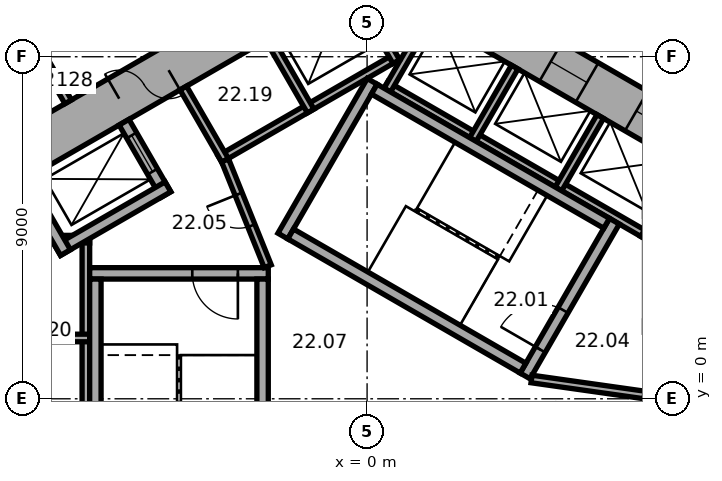
"""IFC4 building model, lengths in metres.
Left out: names, types, materials, properties, quantities, classifications, styles, units other than length and angle.
Written with IfcOpenShell. Run it as: python <this file> out.ifc"""

import sys

from ifc_helpers import new_model, si_unit, direction, frame, frame_2d, origin, place, context, subcontext, project, spatial, rectangle, extrude, element, fill, save


model = new_model("IFC4")
c1 = context("Model", 3, precision=1e-05, world=origin(), true_north=direction((0.0, 1.0)))
c2 = subcontext(c1, "Body", "Model", "MODEL_VIEW")
j1 = project(units=[si_unit("LENGTHUNIT", "METRE"), si_unit("PLANEANGLEUNIT", "RADIAN")], contexts=[c1])
p1 = place(None, origin())
s1 = spatial("IfcSite", under=j1, at=p1, CompositionType="ELEMENT")
p2 = place(p1, origin())
s2 = spatial("IfcBuilding", under=s1, at=p2, CompositionType="ELEMENT")
p3 = place(p2, frame((0.0, 0.0, 96.8)))
s3 = spatial("IfcBuildingStorey", under=s2, at=p3, CompositionType="ELEMENT", Elevation=96.8)
p4 = place(p3, frame((10.4, 5.658, 0.0), z_axis=(0.0, 0.0, 1.0), x_axis=(-0.866021384402, 0.500006961711, 0.0)))
e1 = element("IfcWall", 1, at=p4, inside=s3, PredefinedType="SHEAR", context=c2, shape_type="SweptSolid", body=[
    extrude(rectangle(XDim=12.355, YDim=1.2, at=frame_2d((6.178, 0.0))), origin(), (0.0, 0.0, 1.0), 3.3),
])
p5 = place(p4, frame((2.728, 0.0, 0.0)))
e2 = element("IfcOpeningElement", 2, at=p5, cuts=e1, PredefinedType="OPENING", context=c2, shape_type="SweptSolid", body=[
    extrude(rectangle(XDim=1.1, YDim=2.1, at=frame_2d((0.55, 1.05))), frame((0.0, 0.61, 0.0), z_axis=(0.0, -1.0, 0.0), x_axis=(1.0, 0.0, 0.0)), (0.0, 0.0, 1.0), 1.22),
])
p6 = place(p4, frame((5.328, 0.0, 0.0)))
e3 = element("IfcOpeningElement", 3, at=p6, cuts=e1, PredefinedType="OPENING", context=c2, shape_type="SweptSolid", body=[
    extrude(rectangle(XDim=1.1, YDim=2.1, at=frame_2d((0.55, 1.05))), frame((0.0, 0.61, 0.0), z_axis=(0.0, -1.0, 0.0), x_axis=(1.0, 0.0, 0.0)), (0.0, 0.0, 1.0), 1.22),
])
p7 = place(p4, frame((7.928, 0.0, 0.0)))
e4 = element("IfcOpeningElement", 4, at=p7, cuts=e1, PredefinedType="OPENING", context=c2, shape_type="SweptSolid", body=[
    extrude(rectangle(XDim=1.1, YDim=2.1, at=frame_2d((0.55, 1.05))), frame((0.0, 0.61, 0.0), z_axis=(0.0, -1.0, 0.0), x_axis=(1.0, 0.0, 0.0)), (0.0, 0.0, 1.0), 1.22),
])
p8 = place(p3, frame((0.3, 11.836, 0.0), z_axis=(0.0, 0.0, 1.0), x_axis=(-0.866021384402, -0.500006961711, 0.0)))
e5 = element("IfcWall", 5, at=p8, inside=s3, PredefinedType="SHEAR", context=c2, shape_type="SweptSolid", body=[
    extrude(rectangle(XDim=12.355, YDim=1.2, at=frame_2d((6.178, 0.0))), origin(), (0.0, 0.0, 1.0), 3.3),
])
p9 = place(p8, frame((6.378, 0.0, 0.0)))
e6 = element("IfcOpeningElement", 6, at=p9, cuts=e5, PredefinedType="OPENING", context=c2, shape_type="SweptSolid", body=[
    extrude(rectangle(XDim=1.5, YDim=2.1, at=frame_2d((0.75, 1.05))), frame((0.0, 0.61, 0.0), z_axis=(0.0, -1.0, 0.0), x_axis=(1.0, 0.0, 0.0)), (0.0, 0.0, 1.0), 1.22),
])
p10 = place(p8, frame((1.828, 0.0, 0.0)))
e7 = element("IfcOpeningElement", 7, at=p10, cuts=e5, PredefinedType="OPENING", context=c2, shape_type="SweptSolid", body=[
    extrude(rectangle(XDim=1.1, YDim=2.1, at=frame_2d((0.55, 1.05))), frame((0.0, 0.61, 0.0), z_axis=(0.0, -1.0, 0.0), x_axis=(1.0, 0.0, 0.0)), (0.0, 0.0, 1.0), 1.22),
])
p11 = place(p3, frame((7.424, 4.259, 0.0), z_axis=(0.0, 0.0, 1.0), x_axis=(-0.866026010844, 0.49999894854, 0.0)))
e8 = element("IfcWall", 8, at=p11, inside=s3, PredefinedType="PARTITIONING", context=c2, shape_type="SweptSolid", body=[
    extrude(rectangle(XDim=8.0, YDim=0.2, at=frame_2d((4.0, 0.0))), origin(), (0.0, 0.0, 1.0), 3.05),
])
for number, where, z_axis, x_axis in (
    (9, (7.287, 4.222, 0.0), (0.0, 0.0, 1.0), (0.5, 0.866, 0.0)),
    (10, (5.036, 5.522, 0.0), (0.0, 0.0, 1.0), (0.5, 0.866, 0.0)),
    (11, (2.784, 6.822, 0.0), (0.0, 0.0, 1.0), (0.5, 0.866, 0.0)),
    (12, (0.532, 8.122, 0.0), (0.0, 0.0, 1.0), (0.5, 0.866, 0.0)),
):
    element("IfcWall", number, at=place(p3, frame(where, z_axis=z_axis, x_axis=x_axis)), inside=s3, PredefinedType="PARTITIONING", context=c2, shape_type="SweptSolid", body=[
        extrude(rectangle(XDim=2.2, YDim=0.2, at=frame_2d((1.1, 0.0))), origin(), (0.0, 0.0, 1.0), 3.05),
    ])
p12 = place(p3, frame((0.803, 9.009, 0.0), z_axis=(0.0, 0.0, 1.0), x_axis=(-0.866028230842, -0.499995103361, 0.0)))
e13 = element("IfcWall", 13, at=p12, inside=s3, PredefinedType="PARTITIONING", context=c2, shape_type="SweptSolid", body=[
    extrude(rectangle(XDim=5.4, YDim=0.2, at=frame_2d((2.7, 0.0))), origin(), (0.0, 0.0, 1.0), 3.05),
])
p13 = place(p3, frame((0.767, 8.872, 0.0), z_axis=(0.0, 0.0, 1.0), x_axis=(-0.499994660107, 0.866028486751, 0.0)))
e14 = element("IfcWall", 14, at=p13, inside=s3, PredefinedType="PARTITIONING", context=c2, shape_type="SweptSolid", body=[
    extrude(rectangle(XDim=2.2, YDim=0.2, at=frame_2d((1.1, 0.0))), origin(), (0.0, 0.0, 1.0), 3.05),
])
for number, where, z_axis, x_axis in (
    (15, (-1.485, 7.572, 0.0), (0.0, 0.0, 1.0), (-0.5, 0.866, 0.0)),
    (16, (-3.737, 6.272, 0.0), (0.0, 0.0, 1.0), (-0.5, 0.866, 0.0)),
):
    element("IfcWall", number, at=place(p3, frame(where, z_axis=z_axis, x_axis=x_axis)), inside=s3, PredefinedType="PARTITIONING", context=c2, shape_type="SweptSolid", body=[
        extrude(rectangle(XDim=2.2, YDim=0.2, at=frame_2d((1.1, 0.0))), origin(), (0.0, 0.0, 1.0), 3.05),
    ])
p14 = place(p3, frame((-7.4, 4.3, 0.0), z_axis=(0.0, 0.0, 1.0), x_axis=(0.0, -1.0, 0.0)))
e17 = element("IfcWall", 17, at=p14, inside=s3, PredefinedType="PARTITIONING", context=c2, shape_type="SweptSolid", body=[
    extrude(rectangle(XDim=8.0, YDim=0.2, at=frame_2d((4.0, 0.0))), origin(), (0.0, 0.0, 1.0), 3.05),
])
for number, where, z_axis, x_axis in (
    (18, (-7.3, 4.2, 0.0), (0.0, 0.0, 1.0), (-1.0, 0.0, 0.0)),
    (19, (-7.3, 1.6, 0.0), (0.0, 0.0, 1.0), (-1.0, 0.0, 0.0)),
):
    element("IfcWall", number, at=place(p3, frame(where, z_axis=z_axis, x_axis=x_axis)), inside=s3, PredefinedType="PARTITIONING", context=c2, shape_type="SweptSolid", body=[
        extrude(rectangle(XDim=2.2, YDim=0.2, at=frame_2d((1.1, 0.0))), origin(), (0.0, 0.0, 1.0), 3.05),
    ])
p15 = place(p3, frame((4.158, 0.602, 0.0), z_axis=(0.0, 0.0, 1.0), x_axis=(0.499977259774, 0.866038532462, 0.0)))
e20 = element("IfcWall", 20, at=p15, inside=s3, PredefinedType="SHEAR", context=c2, shape_type="SweptSolid", body=[
    extrude(rectangle(XDim=4.7, YDim=0.3, at=frame_2d((2.35, 0.0))), origin(), (0.0, 0.0, 1.0), 3.05),
])
p16 = place(p15, frame((0.8, 0.0, 0.0)))
e21 = element("IfcOpeningElement", 21, at=p16, cuts=e20, PredefinedType="OPENING", context=c2, shape_type="SweptSolid", body=[
    extrude(rectangle(XDim=1.2, YDim=2.1, at=frame_2d((0.6, 1.05))), frame((0.0, 0.16, 0.0), z_axis=(0.0, -1.0, 0.0), x_axis=(1.0, 0.0, 0.0)), (0.0, 0.0, 1.0), 0.32),
])
p17 = place(p3, frame((-2.216, 4.282, 0.0), z_axis=(0.0, 0.0, 1.0), x_axis=(0.499977259774, 0.866038532462, 0.0)))
e22 = element("IfcWall", 22, at=p17, inside=s3, PredefinedType="SHEAR", context=c2, shape_type="SweptSolid", body=[
    extrude(rectangle(XDim=4.7, YDim=0.3, at=frame_2d((2.35, 0.0))), origin(), (0.0, 0.0, 1.0), 3.05),
])
for number, where, z_axis, x_axis in (
    (23, (4.103, 0.807, 0.0), (0.0, 0.0, 1.0), (-0.866, 0.5, 0.0)),
    (24, (6.303, 4.617, 0.0), (0.0, 0.0, 1.0), (-0.866, 0.5, 0.0)),
):
    element("IfcWall", number, at=place(p3, frame(where, z_axis=z_axis, x_axis=x_axis)), inside=s3, PredefinedType="SHEAR", context=c2, shape_type="SweptSolid", body=[
        extrude(rectangle(XDim=7.06, YDim=0.3, at=frame_2d((3.53, 0.0))), origin(), (0.0, 0.0, 1.0), 3.05),
    ])
p18 = place(p3, frame((-2.6, 3.3, 0.0), z_axis=(0.0, 0.0, 1.0), x_axis=(-1.0, 0.0, 0.0)))
e25 = element("IfcWall", 25, at=p18, inside=s3, PredefinedType="SHEAR", context=c2, shape_type="SweptSolid", body=[
    extrude(rectangle(XDim=4.7, YDim=0.3, at=frame_2d((2.35, 0.0))), origin(), (0.0, 0.0, 1.0), 3.05),
])
p19 = place(p18, frame((0.8, 0.0, 0.0)))
e26 = element("IfcOpeningElement", 26, at=p19, cuts=e25, PredefinedType="OPENING", context=c2, shape_type="SweptSolid", body=[
    extrude(rectangle(XDim=1.2, YDim=2.1, at=frame_2d((0.6, 1.05))), frame((0.0, 0.16, 0.0), z_axis=(0.0, -1.0, 0.0), x_axis=(1.0, 0.0, 0.0)), (0.0, 0.0, 1.0), 0.32),
])
for number, where, z_axis, x_axis in (
    (27, (-2.75, 3.15, 0.0), (0.0, 0.0, 1.0), (0.0, -1.0, 0.0)),
    (28, (-7.15, 3.15, 0.0), (0.0, 0.0, 1.0), (0.0, -1.0, 0.0)),
):
    element("IfcWall", number, at=place(p3, frame(where, z_axis=z_axis, x_axis=x_axis)), inside=s3, PredefinedType="SHEAR", context=c2, shape_type="SweptSolid", body=[
        extrude(rectangle(XDim=7.06, YDim=0.3, at=frame_2d((3.53, 0.0))), origin(), (0.0, 0.0, 1.0), 3.05),
    ])
p20 = place(p3, frame((4.327, 0.521, 0.0), z_axis=(0.0, 0.0, 1.0), x_axis=(0.990124376366, -0.14019172346, 0.0)))
e29 = element("IfcWall", 29, at=p20, inside=s3, PredefinedType="PARTITIONING", context=c2, shape_type="SweptSolid", body=[
    extrude(rectangle(XDim=3.002, YDim=0.2, at=frame_2d((1.501, 0.0))), origin(), (0.0, 0.0, 1.0), 3.05),
])
p21 = place(p3, frame((-5.295, 5.372, 0.0), z_axis=(0.0, 0.0, 1.0), x_axis=(-0.500077893725, 0.86598042715, 0.0)))
e30 = element("IfcWall", 30, at=p21, inside=s3, PredefinedType="SHEAR", context=c2, shape_type="SweptSolid", body=[
    extrude(rectangle(XDim=2.2, YDim=0.3, at=frame_2d((1.1, 0.0))), origin(), (0.0, 0.0, 1.0), 3.05),
])
p22 = place(p21, frame((0.7, 0.0, 0.0)))
e31 = element("IfcOpeningElement", 31, at=p22, cuts=e30, PredefinedType="OPENING", context=c2, shape_type="SweptSolid", body=[
    extrude(rectangle(XDim=1.1, YDim=2.1, at=frame_2d((0.55, 1.05))), frame((0.0, 0.16, 0.0), z_axis=(0.0, -1.0, 0.0), x_axis=(1.0, 0.0, 0.0)), (0.0, 0.0, 1.0), 0.32),
])
p23 = place(p3, frame((-5.24, 5.577, 0.0), z_axis=(0.0, 0.0, 1.0), x_axis=(-0.866014461049, -0.500018952895, 0.0)))
e32 = element("IfcWall", 32, at=p23, inside=s3, PredefinedType="SHEAR", context=c2, shape_type="SweptSolid", body=[
    extrude(rectangle(XDim=3.35, YDim=0.3, at=frame_2d((1.675, 0.0))), origin(), (0.0, 0.0, 1.0), 3.05),
])
p24 = place(p3, frame((-7.937, 3.847, 0.0), z_axis=(0.0, 0.0, 1.0), x_axis=(-0.50002983664, 0.866008176907, 0.0)))
e33 = element("IfcWall", 33, at=p24, inside=s3, PredefinedType="SHEAR", context=c2, shape_type="SweptSolid", body=[
    extrude(rectangle(XDim=2.2, YDim=0.3, at=frame_2d((1.1, 0.0))), origin(), (0.0, 0.0, 1.0), 3.05),
])
p25 = place(p3, frame((-2.615, 3.487, 0.0), z_axis=(0.0, 0.0, 1.0), x_axis=(-0.373576831041, 0.92759924068, 0.0)))
e34 = element("IfcWall", 34, at=p25, inside=s3, PredefinedType="PARTITIONING", context=c2, shape_type="SweptSolid", body=[
    extrude(rectangle(XDim=3.002, YDim=0.2, at=frame_2d((1.501, 0.0))), origin(), (0.0, 0.0, 1.0), 3.05),
])
p26 = place(p25, frame((1.15, 0.0, 0.0)))
e35 = element("IfcOpeningElement", 35, at=p26, cuts=e34, PredefinedType="OPENING", context=c2, shape_type="SweptSolid", body=[
    extrude(rectangle(XDim=0.9, YDim=2.1, at=frame_2d((0.45, 1.05))), frame((0.0, 0.11, 0.0), z_axis=(0.0, -1.0, 0.0), x_axis=(1.0, 0.0, 0.0)), (0.0, 0.0, 1.0), 0.22),
])
p27 = place(p3, frame((-7.865, 7.814, 0.0), z_axis=(0.0, 0.0, 1.0), x_axis=(-0.500004234368, 0.866022959057, 0.0)))
e36 = element("IfcWall", 36, at=p27, inside=s3, PredefinedType="PARTITIONING", context=c2, shape_type="SweptSolid", body=[
    extrude(rectangle(XDim=11.25, YDim=0.2, at=frame_2d((5.625, 0.0))), origin(), (0.0, 0.0, 1.0), 3.05),
])
p28 = place(p27, frame((0.5, 0.0, 0.0)))
e37 = element("IfcOpeningElement", 37, at=p28, cuts=e36, PredefinedType="OPENING", context=c2, shape_type="SweptSolid", body=[
    extrude(rectangle(XDim=0.9, YDim=2.1, at=frame_2d((0.45, 1.05))), frame((0.0, 0.11, 0.0), z_axis=(0.0, -1.0, 0.0), x_axis=(1.0, 0.0, 0.0)), (0.0, 0.0, 1.0), 0.22),
])
p29 = place(p9, origin())
e38 = element("IfcDoor", 38, at=p29, inside=s3, OperationType="DOUBLE_DOOR_SINGLE_SWING", PredefinedType="DOOR", context=c2, shape_type="SweptSolid", body=[
    extrude(rectangle(XDim=1.5, YDim=2.1, at=frame_2d((0.75, 1.05))), frame((0.0, 0.025, 0.0), z_axis=(0.0, -1.0, 0.0), x_axis=(1.0, 0.0, 0.0)), (0.0, 0.0, 1.0), 0.05),
])
fill(e6, e38)
p30 = place(p16, origin())
e39 = element("IfcDoor", 39, at=p30, inside=s3, OperationType="SINGLE_SWING_RIGHT", PredefinedType="DOOR", context=c2, shape_type="SweptSolid", body=[
    extrude(rectangle(XDim=1.2, YDim=2.1, at=frame_2d((0.6, 1.05))), frame((0.0, 0.025, 0.0), z_axis=(0.0, -1.0, 0.0), x_axis=(1.0, 0.0, 0.0)), (0.0, 0.0, 1.0), 0.05),
])
fill(e21, e39)
p31 = place(p19, origin())
e40 = element("IfcDoor", 40, at=p31, inside=s3, OperationType="SINGLE_SWING_RIGHT", PredefinedType="DOOR", context=c2, shape_type="SweptSolid", body=[
    extrude(rectangle(XDim=1.2, YDim=2.1, at=frame_2d((0.6, 1.05))), frame((0.0, 0.025, 0.0), z_axis=(0.0, -1.0, 0.0), x_axis=(1.0, 0.0, 0.0)), (0.0, 0.0, 1.0), 0.05),
])
fill(e26, e40)
p32 = place(p26, origin())
e41 = element("IfcDoor", 41, at=p32, inside=s3, OperationType="SINGLE_SWING_LEFT", PredefinedType="DOOR", context=c2, shape_type="SweptSolid", body=[
    extrude(rectangle(XDim=0.9, YDim=2.1, at=frame_2d((0.45, 1.05))), frame((0.0, 0.025, 0.0), z_axis=(0.0, -1.0, 0.0), x_axis=(1.0, 0.0, 0.0)), (0.0, 0.0, 1.0), 0.05),
])
fill(e35, e41)
p33 = place(p22, origin())
e42 = element("IfcDoor", 42, at=p33, inside=s3, OperationType="DOUBLE_DOOR_SLIDING", PredefinedType="DOOR", context=c2, shape_type="SweptSolid", body=[
    extrude(rectangle(XDim=1.1, YDim=2.1, at=frame_2d((0.55, 1.05))), frame((0.0, 0.025, 0.0), z_axis=(0.0, -1.0, 0.0), x_axis=(1.0, 0.0, 0.0)), (0.0, 0.0, 1.0), 0.05),
])
fill(e31, e42)
p34 = place(p5, origin())
e43 = element("IfcDoor", 43, at=p34, inside=s3, OperationType="DOUBLE_DOOR_SLIDING", PredefinedType="DOOR", context=c2, shape_type="SweptSolid", body=[
    extrude(rectangle(XDim=1.1, YDim=2.1, at=frame_2d((0.55, 1.05))), frame((0.0, 0.025, 0.0), z_axis=(0.0, -1.0, 0.0), x_axis=(1.0, 0.0, 0.0)), (0.0, 0.0, 1.0), 0.05),
])
fill(e2, e43)
p35 = place(p6, origin())
e44 = element("IfcDoor", 44, at=p35, inside=s3, OperationType="DOUBLE_DOOR_SLIDING", PredefinedType="DOOR", context=c2, shape_type="SweptSolid", body=[
    extrude(rectangle(XDim=1.1, YDim=2.1, at=frame_2d((0.55, 1.05))), frame((0.0, 0.025, 0.0), z_axis=(0.0, -1.0, 0.0), x_axis=(1.0, 0.0, 0.0)), (0.0, 0.0, 1.0), 0.05),
])
fill(e3, e44)
p36 = place(p28, origin())
e45 = element("IfcDoor", 45, at=p36, inside=s3, OperationType="SINGLE_SWING_LEFT", PredefinedType="DOOR", context=c2, shape_type="SweptSolid", body=[
    extrude(rectangle(XDim=0.9, YDim=2.1, at=frame_2d((0.45, 1.05))), frame((0.0, 0.025, 0.0), z_axis=(0.0, -1.0, 0.0), x_axis=(1.0, 0.0, 0.0)), (0.0, 0.0, 1.0), 0.05),
])
fill(e37, e45)
save(model, sys.argv[1])
